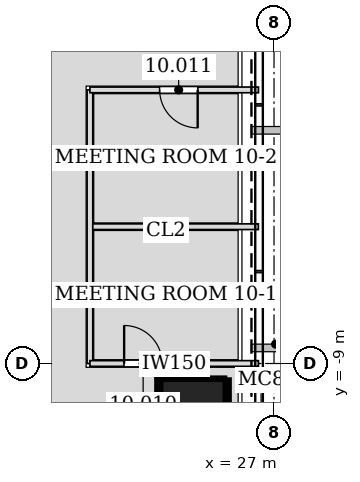
"""IFC4 building model, lengths in metres.
Left out: names, types, materials, properties, quantities, classifications, styles, units other than length and angle.
Written with IfcOpenShell. Run it as: python <this file> out.ifc"""

import sys

from ifc_helpers import new_model, si_unit, direction, frame, frame_2d, origin, origin_2d, place, context, subcontext, project, spatial, rectangle, hollow_rectangle, extrude, element, fill, save


model = new_model("IFC4")
c1 = context("Model", 3, precision=1e-05, world=origin(), true_north=direction((0.0, 1.0)))
c2 = subcontext(c1, "Body", "Model", "MODEL_VIEW")
j1 = project(units=[si_unit("LENGTHUNIT", "METRE"), si_unit("PLANEANGLEUNIT", "RADIAN")], contexts=[c1])
p1 = place(None, origin())
s1 = spatial("IfcSite", under=j1, at=p1, CompositionType="ELEMENT")
p2 = place(p1, origin())
s2 = spatial("IfcBuilding", under=s1, at=p2, CompositionType="ELEMENT")
p3 = place(p2, frame((0.0, 0.0, 49.8)))
s3 = spatial("IfcBuildingStorey", under=s2, at=p3, CompositionType="ELEMENT", Elevation=49.8)
p4 = place(p3, frame((24.928, -10.325, 0.0), z_axis=(-0.028295730207, 0.011736627314, 0.99953069149), x_axis=(-0.383133442967, -0.923693003589, 0.0)))
e1 = element("IfcColumn", 1, at=p4, inside=s3, PredefinedType="COLUMN", context=c2, shape_type="SweptSolid", body=[
    extrude(hollow_rectangle(XDim=1.8, YDim=1.8, WallThickness=0.085, at=origin_2d()), origin(), (0.0, 0.0, 1.0), 4.202),
])
p5 = place(p3, frame((26.588, -5.4, 0.0), z_axis=(0.0, 0.0, 1.0), x_axis=(-1.0, 0.0, 0.0)))
e2 = element("IfcWall", 2, at=p5, inside=s3, PredefinedType="PARTITIONING", context=c2, shape_type="SweptSolid", body=[
    extrude(rectangle(XDim=4.432, YDim=0.15, at=frame_2d((2.216, 0.0))), origin(), (0.0, 0.0, 1.0), 3.418),
])
p6 = place(p3, frame((22.156, -9.0, 0.0), z_axis=(0.0, 0.0, 1.0), x_axis=(0.0, 1.0, 0.0)))
e3 = element("IfcWall", 3, at=p6, inside=s3, PredefinedType="PARTITIONING", context=c2, shape_type="SweptSolid", body=[
    extrude(rectangle(XDim=7.2, YDim=0.15, at=frame_2d((3.6, 0.0))), origin(), (0.0, 0.0, 1.0), 4.035),
])
p7 = place(p3, frame((22.156, -9.0, 0.0), z_axis=(0.0, 0.0, 1.0), x_axis=(1.0, 0.0, 0.0)))
e4 = element("IfcWall", 4, at=p7, inside=s3, PredefinedType="PARTITIONING", context=c2, shape_type="SweptSolid", body=[
    extrude(rectangle(XDim=4.434, YDim=0.15, at=frame_2d((2.217, 0.0))), origin(), (0.0, 0.0, 1.0), 3.418),
])
p8 = place(p7, frame((0.9, 0.0, 0.0)))
e5 = element("IfcOpeningElement", 5, at=p8, cuts=e4, PredefinedType="OPENING", context=c2, shape_type="SweptSolid", body=[
    extrude(rectangle(XDim=1.0, YDim=2.1, at=frame_2d((0.5, 1.05))), frame((0.0, 0.085, 0.0), z_axis=(0.0, -1.0, 0.0), x_axis=(1.0, 0.0, 0.0)), (0.0, 0.0, 1.0), 0.17),
])
p9 = place(p3, frame((26.59, -1.8, 0.0), z_axis=(0.0, 0.0, 1.0), x_axis=(-1.0, 0.0, 0.0)))
e6 = element("IfcWall", 6, at=p9, inside=s3, PredefinedType="PARTITIONING", context=c2, shape_type="SweptSolid", body=[
    extrude(rectangle(XDim=4.434, YDim=0.15, at=frame_2d((2.217, 0.0))), origin(), (0.0, 0.0, 1.0), 3.418),
])
p10 = place(p9, frame((1.599, 0.0, 0.0)))
e7 = element("IfcOpeningElement", 7, at=p10, cuts=e6, PredefinedType="OPENING", context=c2, shape_type="SweptSolid", body=[
    extrude(rectangle(XDim=1.0, YDim=2.1, at=frame_2d((0.5, 1.05))), frame((0.0, 0.085, 0.0), z_axis=(0.0, -1.0, 0.0), x_axis=(1.0, 0.0, 0.0)), (0.0, 0.0, 1.0), 0.17),
])
p11 = place(p8, origin())
e8 = element("IfcDoor", 8, at=p11, inside=s3, OperationType="SINGLE_SWING_LEFT", PredefinedType="DOOR", context=c2, shape_type="SweptSolid", body=[
    extrude(rectangle(XDim=1.0, YDim=2.1, at=frame_2d((0.5, 1.05))), frame((0.0, 0.025, 0.0), z_axis=(0.0, -1.0, 0.0), x_axis=(1.0, 0.0, 0.0)), (0.0, 0.0, 1.0), 0.05),
])
fill(e5, e8)
p12 = place(p10, origin())
e9 = element("IfcDoor", 9, at=p12, inside=s3, OperationType="SINGLE_SWING_LEFT", PredefinedType="DOOR", context=c2, shape_type="SweptSolid", body=[
    extrude(rectangle(XDim=1.0, YDim=2.1, at=frame_2d((0.5, 1.05))), frame((0.0, 0.025, 0.0), z_axis=(0.0, -1.0, 0.0), x_axis=(1.0, 0.0, 0.0)), (0.0, 0.0, 1.0), 0.05),
])
fill(e7, e9)
save(model, sys.argv[1])
